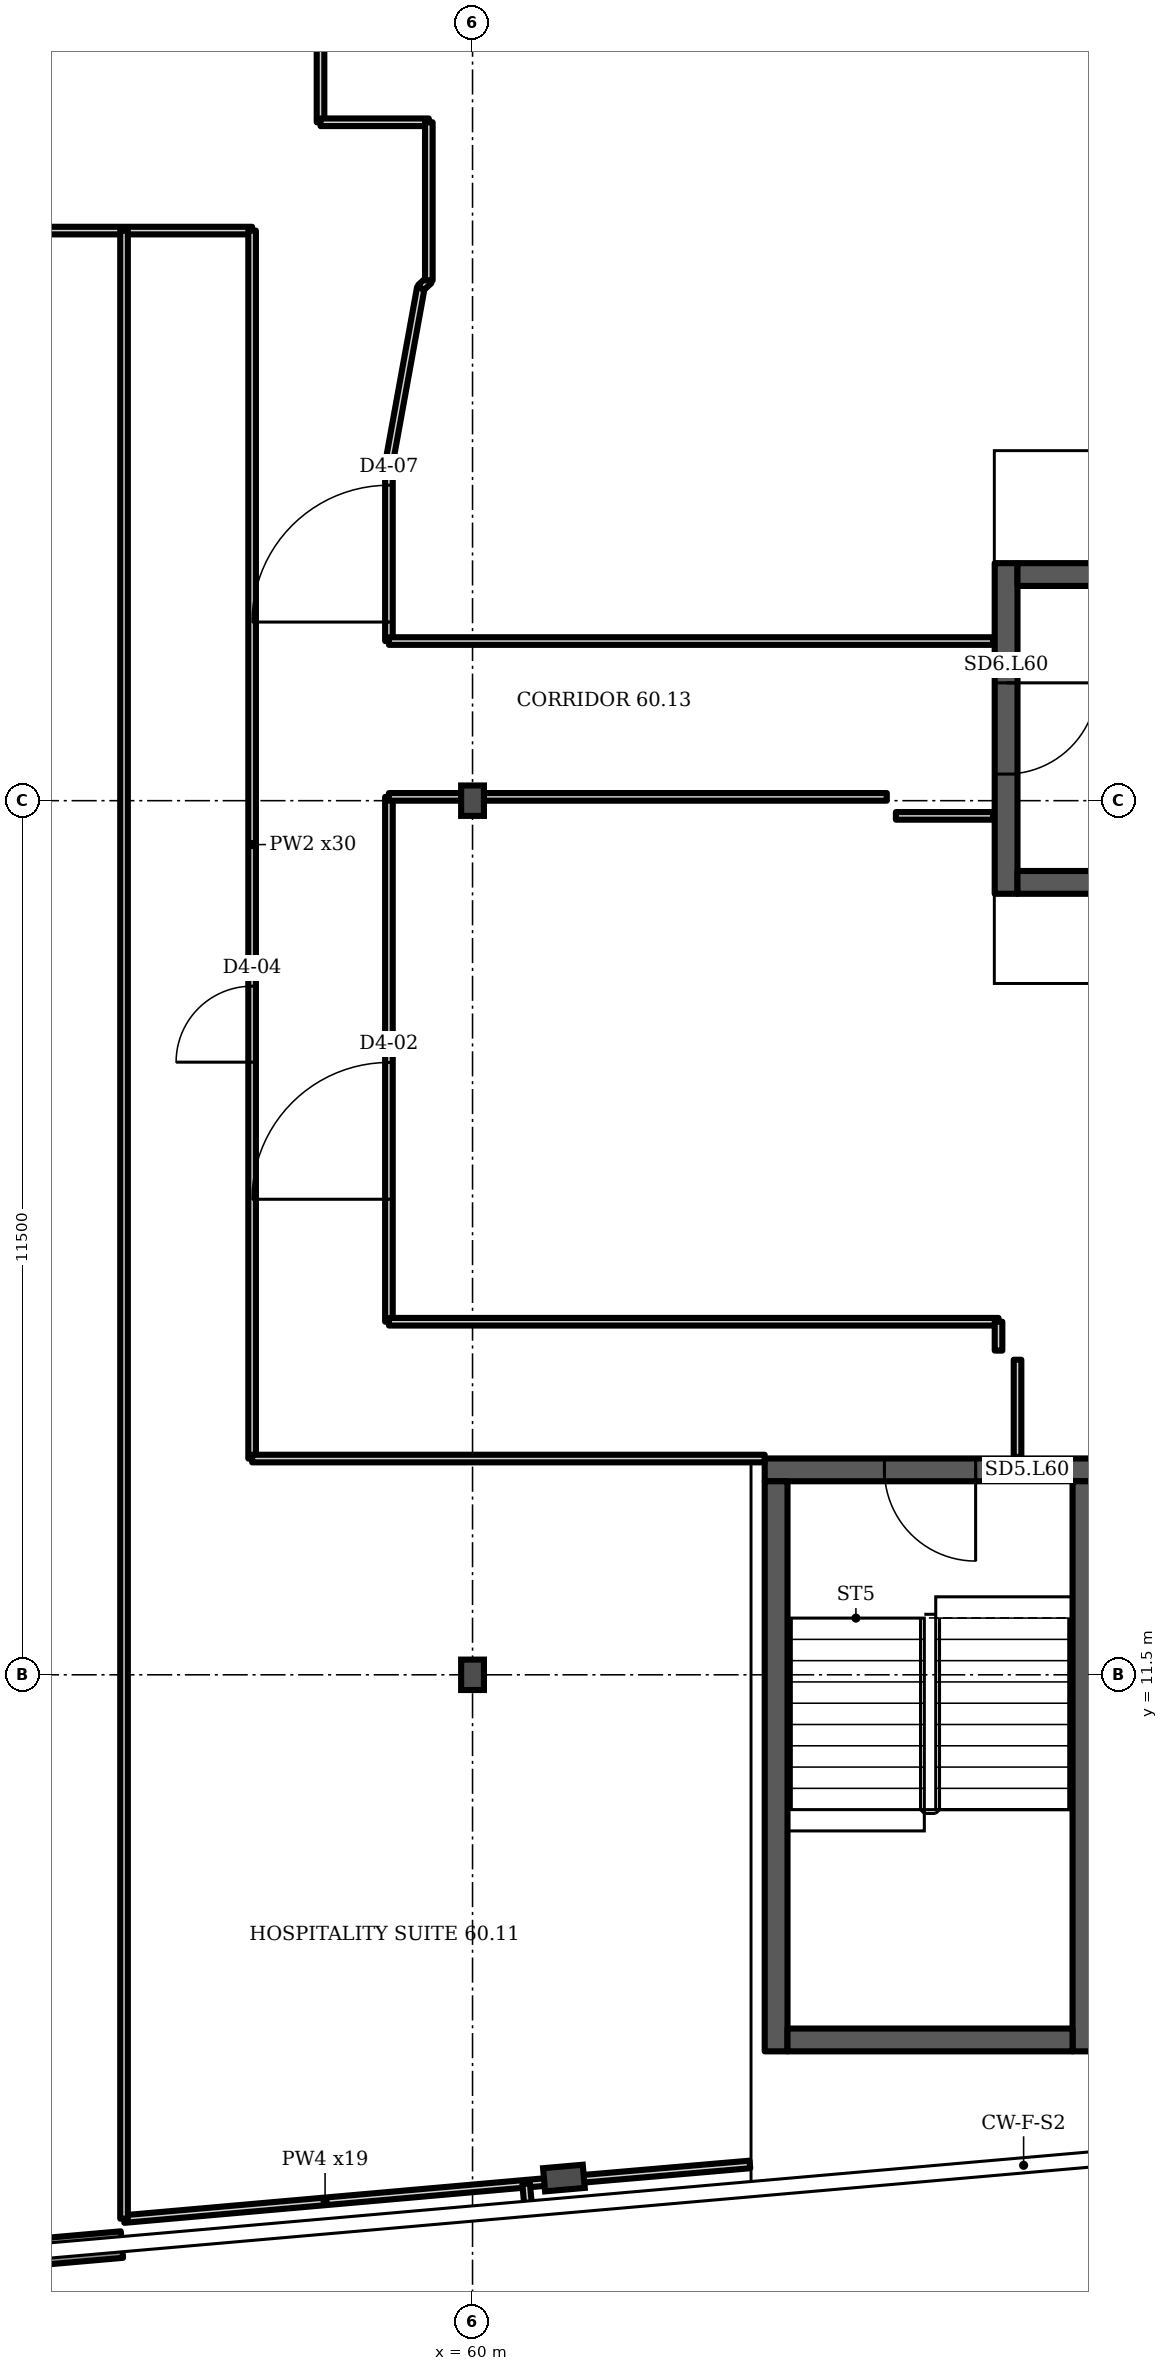
"""IFC4 building model, lengths in metres.
Left out: names, types, materials, properties, quantities, classifications, styles, units other than length and angle.
Written with IfcOpenShell. Run it as: python <this file> out.ifc"""

import sys

from ifc_helpers import new_model, si_unit, direction, frame, frame_2d, origin, origin_2d, place, context, subcontext, project, spatial, rectangle, i_section, extrude, element, fill, save


model = new_model("IFC4")
c1 = context("Model", 3, precision=1e-05, world=origin(), true_north=direction((0.0, 1.0)))
c2 = subcontext(c1, "Body", "Model", "MODEL_VIEW")
j1 = project(units=[si_unit("LENGTHUNIT", "METRE"), si_unit("PLANEANGLEUNIT", "RADIAN")], contexts=[c1])
p1 = place(None, origin())
s1 = spatial("IfcSite", under=j1, at=p1, CompositionType="ELEMENT")
p2 = place(p1, origin())
s2 = spatial("IfcBuilding", under=s1, at=p2, CompositionType="ELEMENT")
p3 = place(p2, frame((0.0, 0.0, 239.5)))
s3 = spatial("IfcBuildingStorey", under=s2, at=p3, CompositionType="ELEMENT", Elevation=239.5)
p4 = place(p3, frame((61.202, 4.879, 0.0), z_axis=(0.0, 0.0, 1.0), x_axis=(0.087156, -0.996197, 0.0)))
e1 = element("IfcColumn", 1, at=p4, inside=s3, PredefinedType="COLUMN", context=c2, shape_type="SweptSolid", body=[
    extrude(i_section(OverallWidth=0.306, OverallDepth=0.524, WebThickness=0.021, FlangeThickness=0.04, FilletRadius=0.027, at=origin_2d()), origin(), (0.0, 0.0, 1.0), 3.6),
])
for number, where, z_axis, x_axis in (
    (2, (60.0, 11.5, 0.0), (0.0, 0.0, 1.0), (1.0, 0.0, 0.0)),
    (3, (60.0, 23.0, 0.0), (0.0, 0.0, 1.0), (1.0, 0.0, 0.0)),
):
    element("IfcColumn", number, at=place(p3, frame(where, z_axis=z_axis, x_axis=x_axis)), inside=s3, PredefinedType="COLUMN", context=c2, shape_type="SweptSolid", body=[
        extrude(i_section(OverallWidth=0.3, OverallDepth=0.4, WebThickness=0.013, FlangeThickness=0.024, FilletRadius=0.027, at=origin_2d()), origin(), (0.0, 0.0, 1.0), 3.6),
    ])
p5 = place(p3, frame((49.545, 3.493, 0.0), z_axis=(0.0, 0.0, 1.0), x_axis=(0.996196, 0.087138, 0.0)))
e4 = element("IfcWall", 4, at=p5, inside=s3, PredefinedType="SOLIDWALL", context=c2, shape_type="SweptSolid", body=[
    extrude(rectangle(XDim=5.864, YDim=0.35, at=frame_2d((2.932, 0.0))), origin(), (0.0, 0.0, 1.0), 1.0),
])
p6 = place(p3, frame((63.844, 14.196, 0.0), z_axis=(0.0, 0.0, 1.0), x_axis=(1.0, 0.0, 0.0)))
e5 = element("IfcWall", 5, at=p6, inside=s3, PredefinedType="SHEAR", context=c2, shape_type="SweptSolid", body=[
    extrude(rectangle(XDim=4.35, YDim=0.3, at=frame_2d((2.175, 0.0))), origin(), (0.0, 0.0, 1.0), 3.2),
])
p7 = place(p6, frame((1.575, 0.0, 0.0)))
e6 = element("IfcOpeningElement", 6, at=p7, cuts=e5, PredefinedType="OPENING", context=c2, shape_type="SweptSolid", body=[
    extrude(rectangle(XDim=1.2, YDim=2.1, at=frame_2d((0.6, 1.05))), frame((0.0, 0.16, 0.0), z_axis=(0.0, -1.0, 0.0), x_axis=(1.0, 0.0, 0.0)), (0.0, 0.0, 1.0), 0.32),
])
p8 = place(p3, frame((67.02, 21.775, 0.0), z_axis=(0.0, 0.0, 1.0), x_axis=(0.0, 1.0, 0.0)))
e7 = element("IfcWall", 7, at=p8, inside=s3, PredefinedType="SHEAR", context=c2, shape_type="SweptSolid", body=[
    extrude(rectangle(XDim=4.35, YDim=0.3, at=frame_2d((2.175, 0.0))), origin(), (0.0, 0.0, 1.0), 3.2),
])
p9 = place(p8, frame((1.575, 0.0, 0.0)))
e8 = element("IfcOpeningElement", 8, at=p9, cuts=e7, PredefinedType="OPENING", context=c2, shape_type="SweptSolid", body=[
    extrude(rectangle(XDim=1.2, YDim=2.1, at=frame_2d((0.6, 1.05))), frame((0.0, 0.16, 0.0), z_axis=(0.0, -1.0, 0.0), x_axis=(1.0, 0.0, 0.0)), (0.0, 0.0, 1.0), 0.32),
])
p10 = place(p3, frame((44.15, 30.5, 0.0), z_axis=(0.0, 0.0, 1.0), x_axis=(1.0, 0.0, 0.0)))
e9 = element("IfcWall", 9, at=p10, inside=s3, PredefinedType="PARTITIONING", context=c2, shape_type="SweptSolid", body=[
    extrude(rectangle(XDim=12.95, YDim=0.1, at=frame_2d((6.475, 0.0))), origin(), (0.0, 0.0, 1.0), 3.2),
])
p11 = place(p10, frame((5.17, 0.0, 0.0)))
e10 = element("IfcOpeningElement", 10, at=p11, cuts=e9, PredefinedType="OPENING", context=c2, shape_type="SweptSolid", body=[
    extrude(rectangle(XDim=1.0, YDim=2.1, at=frame_2d((0.5, 1.05))), frame((0.0, 0.06, 0.0), z_axis=(0.0, -1.0, 0.0), x_axis=(1.0, 0.0, 0.0)), (0.0, 0.0, 1.0), 0.12),
])
p12 = place(p3, frame((55.415, 4.34, 0.0), z_axis=(0.0, 0.0, 1.0), x_axis=(0.996159, 0.087534, 0.0)))
e11 = element("IfcWall", 11, at=p12, inside=s3, PredefinedType="PARTITIONING", context=c2, shape_type="SweptSolid", body=[
    extrude(rectangle(XDim=5.31, YDim=0.1, at=frame_2d((2.655, 0.0))), origin(), (0.0, 0.0, 1.0), 2.58),
])
p13 = place(p3, frame((55.415, 4.345, 0.0), z_axis=(0.0, 0.0, 1.0), x_axis=(0.0, 1.0, 0.0)))
e12 = element("IfcWall", 12, at=p13, inside=s3, PredefinedType="PARTITIONING", context=c2, shape_type="SweptSolid", body=[
    extrude(rectangle(XDim=26.155, YDim=0.1, at=frame_2d((13.078, 0.0))), origin(), (0.0, 0.0, 1.0), 3.2),
])
p14 = place(p3, frame((57.1, 14.345, 0.0), z_axis=(0.0, 0.0, 1.0), x_axis=(0.0, 1.0, 0.0)))
e13 = element("IfcWall", 13, at=p14, inside=s3, PredefinedType="PARTITIONING", context=c2, shape_type="SweptSolid", body=[
    extrude(rectangle(XDim=16.155, YDim=0.1, at=frame_2d((8.078, 0.0))), origin(), (0.0, 0.0, 1.0), 3.2),
])
p15 = place(p14, frame((5.215, 0.0, 0.0)))
e14 = element("IfcOpeningElement", 14, at=p15, cuts=e13, PredefinedType="OPENING", context=c2, shape_type="SweptSolid", body=[
    extrude(rectangle(XDim=1.0, YDim=2.1, at=frame_2d((0.5, 1.05))), frame((0.0, 0.06, 0.0), z_axis=(0.0, -1.0, 0.0), x_axis=(1.0, 0.0, 0.0)), (0.0, 0.0, 1.0), 0.12),
])
p16 = place(p3, frame((57.1, 14.345, 0.0), z_axis=(0.0, 0.0, 1.0), x_axis=(1.0, 0.0, 0.0)))
e15 = element("IfcWall", 15, at=p16, inside=s3, PredefinedType="PARTITIONING", context=c2, shape_type="SweptSolid", body=[
    extrude(rectangle(XDim=6.744, YDim=0.1, at=frame_2d((3.372, 0.0))), origin(), (0.0, 0.0, 1.0), 3.2),
])
p17 = place(p3, frame((58.0, 31.925, 0.0), z_axis=(0.0, 0.0, 1.0), x_axis=(0.0, 1.0, 0.0)))
e16 = element("IfcWall", 16, at=p17, inside=s3, PredefinedType="PARTITIONING", context=c2, shape_type="SweptSolid", body=[
    extrude(rectangle(XDim=2.055, YDim=0.1, at=frame_2d((1.027, 0.0))), origin(), (0.0, 0.0, 1.0), 3.2),
])
p18 = place(p3, frame((58.0, 31.925, 0.0), z_axis=(0.0, 0.0, 1.0), x_axis=(1.0, 0.0, 0.0)))
e17 = element("IfcWall", 17, at=p18, inside=s3, PredefinedType="PARTITIONING", context=c2, shape_type="SweptSolid", body=[
    extrude(rectangle(XDim=1.425, YDim=0.1, at=frame_2d((0.712, 0.0))), origin(), (0.0, 0.0, 1.0), 3.2),
])
p19 = place(p3, frame((58.9, 16.145, 0.0), z_axis=(0.0, 0.0, 1.0), x_axis=(0.0, 1.0, 0.0)))
e18 = element("IfcWall", 18, at=p19, inside=s3, PredefinedType="PARTITIONING", context=c2, shape_type="SweptSolid", body=[
    extrude(rectangle(XDim=6.905, YDim=0.1, at=frame_2d((3.453, 0.0))), origin(), (0.0, 0.0, 1.0), 3.2),
])
p20 = place(p19, frame((1.611, 0.0, 0.0)))
e19 = element("IfcOpeningElement", 19, at=p20, cuts=e18, PredefinedType="OPENING", context=c2, shape_type="SweptSolid", body=[
    extrude(rectangle(XDim=1.8, YDim=2.1, at=frame_2d((0.9, 1.05))), frame((0.0, 0.06, 0.0), z_axis=(0.0, -1.0, 0.0), x_axis=(1.0, 0.0, 0.0)), (0.0, 0.0, 1.0), 0.12),
])
p21 = place(p3, frame((58.9, 16.145, 0.0), z_axis=(0.0, 0.0, 1.0), x_axis=(1.0, 0.0, 0.0)))
e20 = element("IfcWall", 20, at=p21, inside=s3, PredefinedType="PARTITIONING", context=c2, shape_type="SweptSolid", body=[
    extrude(rectangle(XDim=8.02, YDim=0.1, at=frame_2d((4.01, 0.0))), origin(), (0.0, 0.0, 1.0), 3.2),
])
p22 = place(p3, frame((58.9, 23.05, 0.0), z_axis=(0.0, 0.0, 1.0), x_axis=(1.0, 0.0, 0.0)))
e21 = element("IfcWall", 21, at=p22, inside=s3, PredefinedType="PARTITIONING", context=c2, shape_type="SweptSolid", body=[
    extrude(rectangle(XDim=6.55, YDim=0.1, at=frame_2d((3.275, 0.0))), origin(), (0.0, 0.0, 1.0), 3.2),
])
p23 = place(p3, frame((58.9, 25.1, 0.0), z_axis=(0.0, 0.0, 1.0), x_axis=(0.0, 1.0, 0.0)))
e22 = element("IfcWall", 22, at=p23, inside=s3, PredefinedType="PARTITIONING", context=c2, shape_type="SweptSolid", body=[
    extrude(rectangle(XDim=2.335, YDim=0.1, at=frame_2d((1.167, 0.0))), origin(), (0.0, 0.0, 1.0), 3.2),
])
p24 = place(p23, frame((0.25, 0.0, 0.0)))
e23 = element("IfcOpeningElement", 23, at=p24, cuts=e22, PredefinedType="OPENING", context=c2, shape_type="SweptSolid", body=[
    extrude(rectangle(XDim=1.8, YDim=2.1, at=frame_2d((0.9, 1.05))), frame((0.0, 0.06, 0.0), z_axis=(0.0, -1.0, 0.0), x_axis=(1.0, 0.0, 0.0)), (0.0, 0.0, 1.0), 0.12),
])
p25 = place(p3, frame((58.9, 25.1, 0.0), z_axis=(0.0, 0.0, 1.0), x_axis=(1.0, 0.0, 0.0)))
e24 = element("IfcWall", 24, at=p25, inside=s3, PredefinedType="PARTITIONING", context=c2, shape_type="SweptSolid", body=[
    extrude(rectangle(XDim=7.95, YDim=0.1, at=frame_2d((3.975, 0.0))), origin(), (0.0, 0.0, 1.0), 3.2),
])
p26 = place(p3, frame((58.9, 27.435, 0.0), z_axis=(0.0, 0.0, 1.0), x_axis=(0.178584, 0.983924, 0.0)))
e25 = element("IfcWall", 25, at=p26, inside=s3, PredefinedType="PARTITIONING", context=c2, shape_type="SweptSolid", body=[
    extrude(rectangle(XDim=2.353, YDim=0.1, at=frame_2d((1.176, 0.0))), origin(), (0.0, 0.0, 1.0), 3.2),
])
p27 = place(p3, frame((59.32, 29.75, 0.0), z_axis=(0.0, 0.0, 1.0), x_axis=(0.741581, 0.670872, 0.0)))
e26 = element("IfcWall", 26, at=p27, inside=s3, PredefinedType="PARTITIONING", context=c2, shape_type="SweptSolid", body=[
    extrude(rectangle(XDim=0.142, YDim=0.1, at=frame_2d((0.071, 0.0))), origin(), (0.0, 0.0, 1.0), 3.2),
])
p28 = place(p3, frame((59.425, 29.845, 0.0), z_axis=(0.0, 0.0, 1.0), x_axis=(0.0, 1.0, 0.0)))
e27 = element("IfcWall", 27, at=p28, inside=s3, PredefinedType="PARTITIONING", context=c2, shape_type="SweptSolid", body=[
    extrude(rectangle(XDim=2.08, YDim=0.1, at=frame_2d((1.04, 0.0))), origin(), (0.0, 0.0, 1.0), 3.2),
])
p29 = place(p3, frame((60.705, 4.805, 0.0), z_axis=(0.0, 0.0, 1.0), x_axis=(0.996324, 0.085692, 0.0)))
e28 = element("IfcWall", 28, at=p29, inside=s3, PredefinedType="PARTITIONING", context=c2, shape_type="SweptSolid", body=[
    extrude(rectangle(XDim=2.955, YDim=0.1, at=frame_2d((1.477, 0.0))), origin(), (0.0, 0.0, 1.0), 2.58),
])
p30 = place(p3, frame((60.733, 4.497, 0.0), z_axis=(0.0, 0.0, 1.0), x_axis=(-0.090037, 0.995936, 0.0)))
e29 = element("IfcWall", 29, at=p30, inside=s3, PredefinedType="PARTITIONING", context=c2, shape_type="SweptSolid", body=[
    extrude(rectangle(XDim=0.309, YDim=0.1, at=frame_2d((0.155, 0.0))), origin(), (0.0, 0.0, 1.0), 3.2),
])
p31 = place(p3, frame((65.57, 22.8, 0.0), z_axis=(0.0, 0.0, 1.0), x_axis=(1.0, 0.0, 0.0)))
e30 = element("IfcWall", 30, at=p31, inside=s3, PredefinedType="PARTITIONING", context=c2, shape_type="SweptSolid", body=[
    extrude(rectangle(XDim=1.28, YDim=0.1, at=frame_2d((0.64, 0.0))), origin(), (0.0, 0.0, 1.0), 3.2),
])
p32 = place(p3, frame((66.92, 15.765, 0.0), z_axis=(0.0, 0.0, 1.0), x_axis=(0.0, 1.0, 0.0)))
e31 = element("IfcWall", 31, at=p32, inside=s3, PredefinedType="PARTITIONING", context=c2, shape_type="SweptSolid", body=[
    extrude(rectangle(XDim=0.38, YDim=0.1, at=frame_2d((0.19, 0.0))), origin(), (0.0, 0.0, 1.0), 3.2),
])
p33 = place(p3, frame((67.17, 14.366, 0.0), z_axis=(0.0, 0.0, 1.0), x_axis=(0.0, 1.0, 0.0)))
e32 = element("IfcWall", 32, at=p33, inside=s3, PredefinedType="PARTITIONING", context=c2, shape_type="SweptSolid", body=[
    extrude(rectangle(XDim=1.279, YDim=0.1, at=frame_2d((0.639, 0.0))), origin(), (0.0, 0.0, 1.0), 3.2),
])
for number, where, z_axis, x_axis in (
    (33, (63.994, 6.546, 0.0), (0.0, 0.0, 1.0), (0.0, 1.0, 0.0)),
    (34, (68.044, 6.546, 0.0), (0.0, 0.0, 1.0), (0.0, 1.0, 0.0)),
):
    element("IfcWall", number, at=place(p3, frame(where, z_axis=z_axis, x_axis=x_axis)), inside=s3, PredefinedType="SHEAR", context=c2, shape_type="SweptSolid", body=[
        extrude(rectangle(XDim=7.5, YDim=0.3, at=frame_2d((3.75, 0.0))), origin(), (0.0, 0.0, 1.0), 3.2),
    ])
p34 = place(p3, frame((64.144, 6.696, 0.0), z_axis=(0.0, 0.0, 1.0), x_axis=(1.0, 0.0, 0.0)))
e35 = element("IfcWall", 35, at=p34, inside=s3, PredefinedType="SHEAR", context=c2, shape_type="SweptSolid", body=[
    extrude(rectangle(XDim=3.75, YDim=0.3, at=frame_2d((1.875, 0.0))), origin(), (0.0, 0.0, 1.0), 3.2),
])
for number, where, z_axis, x_axis in (
    (36, (67.17, 21.925, 0.0), (0.0, 0.0, 1.0), (1.0, 0.0, 0.0)),
    (37, (67.17, 25.975, 0.0), (0.0, 0.0, 1.0), (1.0, 0.0, 0.0)),
):
    element("IfcWall", number, at=place(p3, frame(where, z_axis=z_axis, x_axis=x_axis)), inside=s3, PredefinedType="SHEAR", context=c2, shape_type="SweptSolid", body=[
        extrude(rectangle(XDim=7.5, YDim=0.3, at=frame_2d((3.75, 0.0))), origin(), (0.0, 0.0, 1.0), 3.2),
    ])
p35 = place(p7, origin())
e38 = element("IfcDoor", 38, at=p35, inside=s3, OperationType="SINGLE_SWING_RIGHT", PredefinedType="DOOR", context=c2, shape_type="SweptSolid", body=[
    extrude(rectangle(XDim=1.2, YDim=2.1, at=frame_2d((0.6, 1.05))), frame((0.0, 0.025, 0.0), z_axis=(0.0, -1.0, 0.0), x_axis=(1.0, 0.0, 0.0)), (0.0, 0.0, 1.0), 0.05),
])
fill(e6, e38)
p36 = place(p9, origin())
e39 = element("IfcDoor", 39, at=p36, inside=s3, OperationType="SINGLE_SWING_RIGHT", PredefinedType="DOOR", context=c2, shape_type="SweptSolid", body=[
    extrude(rectangle(XDim=1.2, YDim=2.1, at=frame_2d((0.6, 1.05))), frame((0.0, 0.025, 0.0), z_axis=(0.0, -1.0, 0.0), x_axis=(1.0, 0.0, 0.0)), (0.0, 0.0, 1.0), 0.05),
])
fill(e8, e39)
p37 = place(p20, origin())
e40 = element("IfcDoor", 40, at=p37, inside=s3, OperationType="DOUBLE_DOOR_SINGLE_SWING", PredefinedType="DOOR", context=c2, shape_type="SweptSolid", body=[
    extrude(rectangle(XDim=1.8, YDim=2.1, at=frame_2d((0.9, 1.05))), frame((0.0, 0.025, 0.0), z_axis=(0.0, -1.0, 0.0), x_axis=(1.0, 0.0, 0.0)), (0.0, 0.0, 1.0), 0.05),
])
fill(e19, e40)
p38 = place(p15, origin())
e41 = element("IfcDoor", 41, at=p38, inside=s3, OperationType="SINGLE_SWING_LEFT", PredefinedType="DOOR", context=c2, shape_type="SweptSolid", body=[
    extrude(rectangle(XDim=1.0, YDim=2.1, at=frame_2d((0.5, 1.05))), frame((0.0, 0.025, 0.0), z_axis=(0.0, -1.0, 0.0), x_axis=(1.0, 0.0, 0.0)), (0.0, 0.0, 1.0), 0.05),
])
fill(e14, e41)
p39 = place(p24, origin())
e42 = element("IfcDoor", 42, at=p39, inside=s3, OperationType="DOUBLE_DOOR_SINGLE_SWING", PredefinedType="DOOR", context=c2, shape_type="SweptSolid", body=[
    extrude(rectangle(XDim=1.8, YDim=2.1, at=frame_2d((0.9, 1.05))), frame((0.0, 0.025, 0.0), z_axis=(0.0, -1.0, 0.0), x_axis=(1.0, 0.0, 0.0)), (0.0, 0.0, 1.0), 0.05),
])
fill(e23, e42)
save(model, sys.argv[1])
